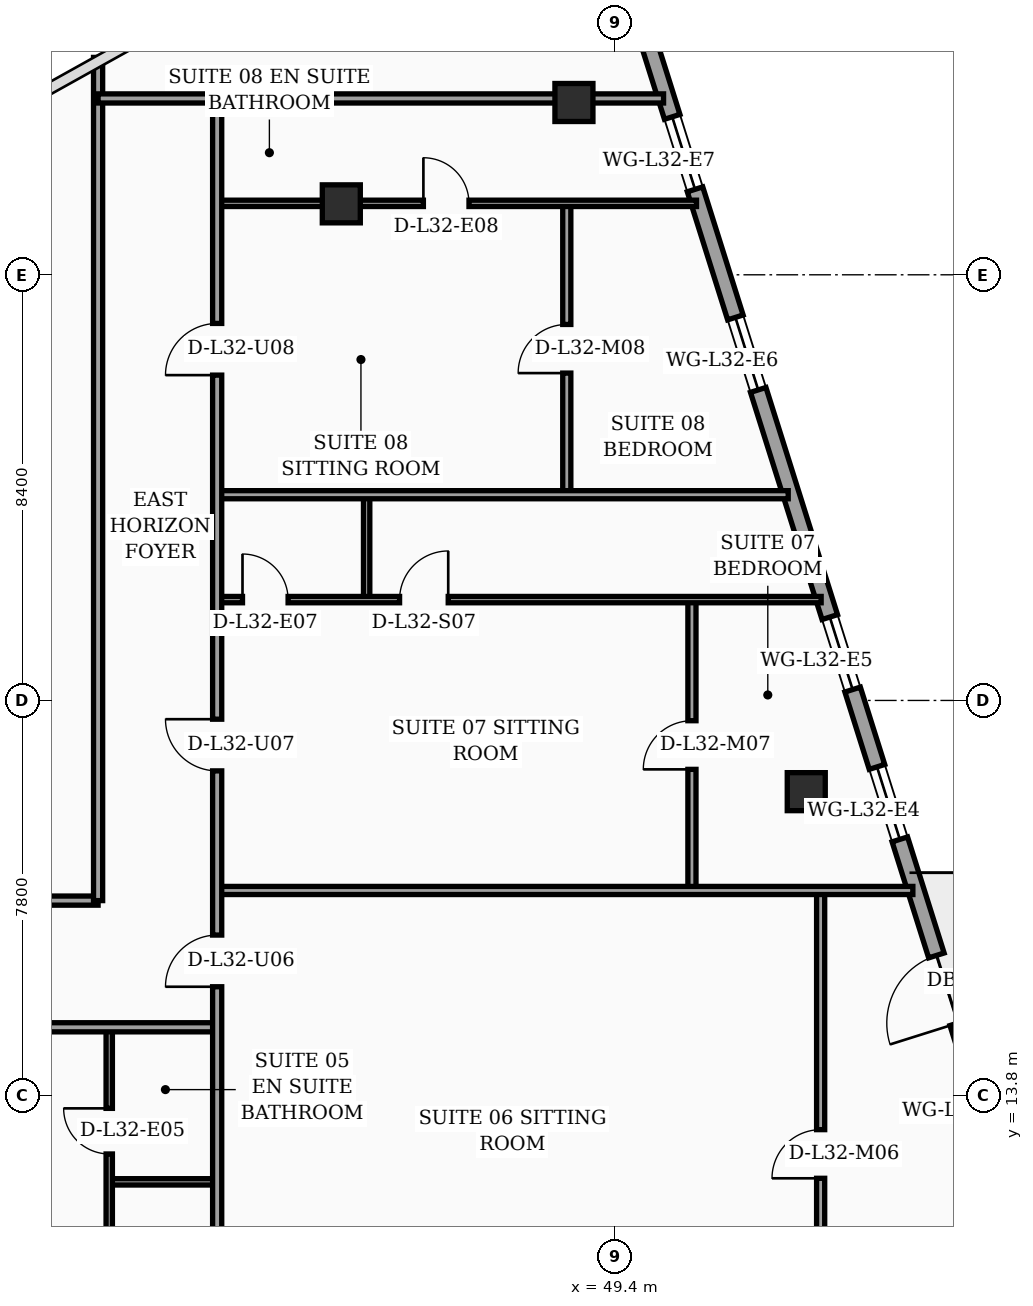
"""IFC4 building model, lengths in metres.
Left out: names, types, materials, properties, quantities, classifications, styles, units other than length and angle.
Written with IfcOpenShell. Run it as: python <this file> out.ifc"""

import sys

from ifc_helpers import new_model, si_unit, direction, frame, frame_2d, origin, origin_2d, place, context, subcontext, project, spatial, rectangle, hollow_rectangle, extrude, element, fill, save


model = new_model("IFC4")
c1 = context("Model", 3, precision=1e-05, world=origin(), true_north=direction((0.0, 1.0)))
c2 = subcontext(c1, "Body", "Model", "MODEL_VIEW")
j1 = project(units=[si_unit("LENGTHUNIT", "METRE"), si_unit("PLANEANGLEUNIT", "RADIAN")], contexts=[c1])
p1 = place(None, origin())
s1 = spatial("IfcSite", under=j1, at=p1, CompositionType="ELEMENT")
p2 = place(p1, origin())
s2 = spatial("IfcBuilding", under=s1, at=p2, CompositionType="ELEMENT")
p3 = place(p2, frame((0.0, 0.0, 131.6)))
s3 = spatial("IfcBuildingStorey", under=s2, at=p3, CompositionType="ELEMENT", Elevation=131.6)
for number, where, z_axis, x_axis in (
    (1, (44.0, 31.4, 0.0), (0.0, 0.0, 1.0), (1.0, 0.0, 0.0)),
    (2, (53.176, 19.8, 0.0), (0.0, 0.0, 1.0), (1.0, 0.0, 0.0)),
    (3, (48.591, 33.4, 0.0), (0.0, 0.0, 1.0), (1.0, 0.0, 0.0)),
):
    element("IfcColumn", number, at=place(p3, frame(where, z_axis=z_axis, x_axis=x_axis)), inside=s3, PredefinedType="COLUMN", context=c2, shape_type="SweptSolid", body=[
        extrude(hollow_rectangle(XDim=0.75, YDim=0.75, WallThickness=0.032, at=origin_2d()), origin(), (0.0, 0.0, 1.0), 3.56),
    ])
p4 = place(p3, frame((59.23, 5.505, 0.0), z_axis=(0.0, 0.0, 1.0), x_axis=(-0.300509063924, 0.953778958931, 0.0)))
e4 = element("IfcWall", 4, at=p4, inside=s3, PredefinedType="SOLIDWALL", context=c2, shape_type="SweptSolid", body=[
    extrude(rectangle(XDim=30.814, YDim=0.32, at=frame_2d((15.407, 0.0))), origin(), (0.0, 0.0, 1.0), 3.56),
])
p5 = place(p4, frame((10.199, 0.0, 0.0)))
e5 = element("IfcOpeningElement", 5, at=p5, cuts=e4, PredefinedType="OPENING", context=c2, shape_type="SweptSolid", body=[
    extrude(rectangle(XDim=1.4, YDim=2.25, at=frame_2d((0.7, 1.125))), frame((0.0, 0.17, 0.0), z_axis=(0.0, -1.0, 0.0), x_axis=(1.0, 0.0, 0.0)), (0.0, 0.0, 1.0), 0.34),
])
p6 = place(p4, frame((2.65, 0.0, 0.75)))
e6 = element("IfcOpeningElement", 6, at=p6, cuts=e4, PredefinedType="OPENING", context=c2, shape_type="SweptSolid", body=[
    extrude(rectangle(XDim=1.5, YDim=1.6, at=frame_2d((0.75, 0.8))), frame((0.0, 0.17, 0.0), z_axis=(0.0, -1.0, 0.0), x_axis=(1.0, 0.0, 0.0)), (0.0, 0.0, 1.0), 0.34),
])
p7 = place(p4, frame((4.7, 0.0, 0.75)))
e7 = element("IfcOpeningElement", 7, at=p7, cuts=e4, PredefinedType="OPENING", context=c2, shape_type="SweptSolid", body=[
    extrude(rectangle(XDim=1.5, YDim=1.6, at=frame_2d((0.75, 0.8))), frame((0.0, 0.17, 0.0), z_axis=(0.0, -1.0, 0.0), x_axis=(1.0, 0.0, 0.0)), (0.0, 0.0, 1.0), 0.34),
])
p8 = place(p4, frame((7.8, 0.0, 0.75)))
e8 = element("IfcOpeningElement", 8, at=p8, cuts=e4, PredefinedType="OPENING", context=c2, shape_type="SweptSolid", body=[
    extrude(rectangle(XDim=1.5, YDim=1.6, at=frame_2d((0.75, 0.8))), frame((0.0, 0.17, 0.0), z_axis=(0.0, -1.0, 0.0), x_axis=(1.0, 0.0, 0.0)), (0.0, 0.0, 1.0), 0.34),
])
p9 = place(p4, frame((14.0, 0.0, 0.75)))
e9 = element("IfcOpeningElement", 9, at=p9, cuts=e4, PredefinedType="OPENING", context=c2, shape_type="SweptSolid", body=[
    extrude(rectangle(XDim=1.5, YDim=1.6, at=frame_2d((0.75, 0.8))), frame((0.0, 0.17, 0.0), z_axis=(0.0, -1.0, 0.0), x_axis=(1.0, 0.0, 0.0)), (0.0, 0.0, 1.0), 0.34),
])
p10 = place(p4, frame((17.1, 0.0, 0.75)))
e10 = element("IfcOpeningElement", 10, at=p10, cuts=e4, PredefinedType="OPENING", context=c2, shape_type="SweptSolid", body=[
    extrude(rectangle(XDim=1.5, YDim=1.6, at=frame_2d((0.75, 0.8))), frame((0.0, 0.17, 0.0), z_axis=(0.0, -1.0, 0.0), x_axis=(1.0, 0.0, 0.0)), (0.0, 0.0, 1.0), 0.34),
])
p11 = place(p4, frame((23.3, 0.0, 0.75)))
e11 = element("IfcOpeningElement", 11, at=p11, cuts=e4, PredefinedType="OPENING", context=c2, shape_type="SweptSolid", body=[
    extrude(rectangle(XDim=1.5, YDim=1.6, at=frame_2d((0.75, 0.8))), frame((0.0, 0.17, 0.0), z_axis=(0.0, -1.0, 0.0), x_axis=(1.0, 0.0, 0.0)), (0.0, 0.0, 1.0), 0.34),
])
p12 = place(p4, frame((27.45, 0.0, 0.75)))
e12 = element("IfcOpeningElement", 12, at=p12, cuts=e4, PredefinedType="OPENING", context=c2, shape_type="SweptSolid", body=[
    extrude(rectangle(XDim=1.5, YDim=1.6, at=frame_2d((0.75, 0.8))), frame((0.0, 0.17, 0.0), z_axis=(0.0, -1.0, 0.0), x_axis=(1.0, 0.0, 0.0)), (0.0, 0.0, 1.0), 0.34),
])
p13 = place(p3, frame((39.42, 12.1, 0.0), z_axis=(0.0, 0.0, 1.0), x_axis=(1.0, 0.0, 0.0)))
e13 = element("IfcWall", 13, at=p13, inside=s3, PredefinedType="PARTITIONING", context=c2, shape_type="SweptSolid", body=[
    extrude(rectangle(XDim=2.13, YDim=0.125, at=frame_2d((1.065, 0.0))), origin(), (0.0, 0.0, 1.0), 3.56),
])
p14 = place(p3, frame((39.42, 2.44, 0.0), z_axis=(0.0, 0.0, 1.0), x_axis=(0.0, 1.0, 0.0)))
e14 = element("IfcWall", 14, at=p14, inside=s3, PredefinedType="PARTITIONING", context=c2, shape_type="SweptSolid", body=[
    extrude(rectangle(XDim=12.71, YDim=0.125, at=frame_2d((6.355, 0.0))), origin(), (0.0, 0.0, 1.0), 2.84),
])
p15 = place(p14, frame((4.35, 0.0, 0.0)))
e15 = element("IfcOpeningElement", 15, at=p15, cuts=e14, PredefinedType="OPENING", context=c2, shape_type="SweptSolid", body=[
    extrude(rectangle(XDim=0.96, YDim=2.2, at=frame_2d((0.48, 1.1))), frame((0.0, 0.073, 0.0), z_axis=(0.0, -1.0, 0.0), x_axis=(1.0, 0.0, 0.0)), (0.0, 0.0, 1.0), 0.145),
])
p16 = place(p14, frame((10.21, 0.0, 0.0)))
e16 = element("IfcOpeningElement", 16, at=p16, cuts=e14, PredefinedType="OPENING", context=c2, shape_type="SweptSolid", body=[
    extrude(rectangle(XDim=0.9, YDim=2.15, at=frame_2d((0.45, 1.075))), frame((0.0, 0.073, 0.0), z_axis=(0.0, -1.0, 0.0), x_axis=(1.0, 0.0, 0.0)), (0.0, 0.0, 1.0), 0.145),
])
p17 = place(p3, frame((32.4, 15.15, 0.0), z_axis=(0.0, 0.0, 1.0), x_axis=(1.0, 0.0, 0.0)))
e17 = element("IfcWall", 17, at=p17, inside=s3, PredefinedType="PARTITIONING", context=c2, shape_type="SweptSolid", body=[
    extrude(rectangle(XDim=9.15, YDim=0.18, at=frame_2d((4.575, 0.0))), origin(), (0.0, 0.0, 1.0), 2.84),
])
p18 = place(p17, frame((3.1, 0.0, 0.0)))
e18 = element("IfcOpeningElement", 18, at=p18, cuts=e17, PredefinedType="OPENING", context=c2, shape_type="SweptSolid", body=[
    extrude(rectangle(XDim=1.02, YDim=2.2, at=frame_2d((0.51, 1.1))), frame((0.0, 0.1, 0.0), z_axis=(0.0, -1.0, 0.0), x_axis=(1.0, 0.0, 0.0)), (0.0, 0.0, 1.0), 0.2),
])
p19 = place(p3, frame((21.5, 17.65, 0.0), z_axis=(0.0, 0.0, 1.0), x_axis=(1.0, 0.0, 0.0)))
e19 = element("IfcWall", 19, at=p19, inside=s3, PredefinedType="PARTITIONING", context=c2, shape_type="SweptSolid", body=[
    extrude(rectangle(XDim=17.7, YDim=0.18, at=frame_2d((8.85, 0.0))), origin(), (0.0, 0.0, 1.0), 2.84),
])
p20 = place(p19, frame((0.95, 0.0, 0.0)))
e20 = element("IfcOpeningElement", 20, at=p20, cuts=e19, PredefinedType="OPENING", context=c2, shape_type="SweptSolid", body=[
    extrude(rectangle(XDim=1.02, YDim=2.2, at=frame_2d((0.51, 1.1))), frame((0.0, 0.1, 0.0), z_axis=(0.0, -1.0, 0.0), x_axis=(1.0, 0.0, 0.0)), (0.0, 0.0, 1.0), 0.2),
])
p21 = place(p19, frame((10.4, 0.0, 0.0)))
e21 = element("IfcOpeningElement", 21, at=p21, cuts=e19, PredefinedType="OPENING", context=c2, shape_type="SweptSolid", body=[
    extrude(rectangle(XDim=1.02, YDim=2.2, at=frame_2d((0.51, 1.1))), frame((0.0, 0.1, 0.0), z_axis=(0.0, -1.0, 0.0), x_axis=(1.0, 0.0, 0.0)), (0.0, 0.0, 1.0), 0.2),
])
p22 = place(p3, frame((39.2, 17.65, 0.0), z_axis=(0.0, 0.0, 1.0), x_axis=(0.0, 1.0, 0.0)))
e22 = element("IfcWall", 22, at=p22, inside=s3, PredefinedType="PARTITIONING", context=c2, shape_type="SweptSolid", body=[
    extrude(rectangle(XDim=16.64, YDim=0.18, at=frame_2d((8.32, 0.0))), origin(), (0.0, 0.0, 1.0), 2.84),
])
p23 = place(p3, frame((53.46, 7.45, 0.0), z_axis=(0.0, 0.0, 1.0), x_axis=(0.0, 1.0, 0.0)))
e23 = element("IfcWall", 23, at=p23, inside=s3, PredefinedType="PARTITIONING", context=c2, shape_type="SweptSolid", body=[
    extrude(rectangle(XDim=10.4, YDim=0.16, at=frame_2d((5.2, 0.0))), origin(), (0.0, 0.0, 1.0), 3.04),
])
p24 = place(p23, frame((4.72, 0.0, 0.0)))
e24 = element("IfcOpeningElement", 24, at=p24, cuts=e23, PredefinedType="OPENING", context=c2, shape_type="SweptSolid", body=[
    extrude(rectangle(XDim=0.96, YDim=2.2, at=frame_2d((0.48, 1.1))), frame((0.0, 0.09, 0.0), z_axis=(0.0, -1.0, 0.0), x_axis=(1.0, 0.0, 0.0)), (0.0, 0.0, 1.0), 0.18),
])
p25 = place(p3, frame((44.5, 23.59, 0.0), z_axis=(0.0, 0.0, 1.0), x_axis=(0.0, 1.0, 0.0)))
e25 = element("IfcWall", 25, at=p25, inside=s3, PredefinedType="PARTITIONING", context=c2, shape_type="SweptSolid", body=[
    extrude(rectangle(XDim=2.07, YDim=0.125, at=frame_2d((1.035, 0.0))), origin(), (0.0, 0.0, 1.0), 3.19),
])
p26 = place(p3, frame((50.92, 17.85, 0.0), z_axis=(0.0, 0.0, 1.0), x_axis=(0.0, 1.0, 0.0)))
e26 = element("IfcWall", 26, at=p26, inside=s3, PredefinedType="PARTITIONING", context=c2, shape_type="SweptSolid", body=[
    extrude(rectangle(XDim=5.74, YDim=0.16, at=frame_2d((2.87, 0.0))), origin(), (0.0, 0.0, 1.0), 2.84),
])
p27 = place(p26, frame((2.39, 0.0, 0.0)))
e27 = element("IfcOpeningElement", 27, at=p27, cuts=e26, PredefinedType="OPENING", context=c2, shape_type="SweptSolid", body=[
    extrude(rectangle(XDim=0.96, YDim=2.2, at=frame_2d((0.48, 1.1))), frame((0.0, 0.09, 0.0), z_axis=(0.0, -1.0, 0.0), x_axis=(1.0, 0.0, 0.0)), (0.0, 0.0, 1.0), 0.18),
])
p28 = place(p3, frame((41.55, 23.59, 0.0), z_axis=(0.0, 0.0, 1.0), x_axis=(1.0, 0.0, 0.0)))
e28 = element("IfcWall", 28, at=p28, inside=s3, PredefinedType="PARTITIONING", context=c2, shape_type="SweptSolid", body=[
    extrude(rectangle(XDim=11.92, YDim=0.125, at=frame_2d((5.96, 0.0))), origin(), (0.0, 0.0, 1.0), 2.84),
])
p29 = place(p28, frame((0.5, 0.0, 0.0)))
e29 = element("IfcOpeningElement", 29, at=p29, cuts=e28, PredefinedType="OPENING", context=c2, shape_type="SweptSolid", body=[
    extrude(rectangle(XDim=0.9, YDim=2.15, at=frame_2d((0.45, 1.075))), frame((0.0, 0.073, 0.0), z_axis=(0.0, -1.0, 0.0), x_axis=(1.0, 0.0, 0.0)), (0.0, 0.0, 1.0), 0.145),
])
p30 = place(p28, frame((3.6, 0.0, 0.0)))
e30 = element("IfcOpeningElement", 30, at=p30, cuts=e28, PredefinedType="OPENING", context=c2, shape_type="SweptSolid", body=[
    extrude(rectangle(XDim=0.96, YDim=2.2, at=frame_2d((0.48, 1.1))), frame((0.0, 0.073, 0.0), z_axis=(0.0, -1.0, 0.0), x_axis=(1.0, 0.0, 0.0)), (0.0, 0.0, 1.0), 0.145),
])
p31 = place(p3, frame((48.45, 25.66, 0.0), z_axis=(0.0, 0.0, 1.0), x_axis=(0.0, 1.0, 0.0)))
e31 = element("IfcWall", 31, at=p31, inside=s3, PredefinedType="PARTITIONING", context=c2, shape_type="SweptSolid", body=[
    extrude(rectangle(XDim=5.75, YDim=0.16, at=frame_2d((2.875, 0.0))), origin(), (0.0, 0.0, 1.0), 3.09),
])
p32 = place(p31, frame((2.4, 0.0, 0.0)))
e32 = element("IfcOpeningElement", 32, at=p32, cuts=e31, PredefinedType="OPENING", context=c2, shape_type="SweptSolid", body=[
    extrude(rectangle(XDim=0.96, YDim=2.2, at=frame_2d((0.48, 1.1))), frame((0.0, 0.09, 0.0), z_axis=(0.0, -1.0, 0.0), x_axis=(1.0, 0.0, 0.0)), (0.0, 0.0, 1.0), 0.18),
])
p33 = place(p3, frame((41.55, 31.41, 0.0), z_axis=(0.0, 0.0, 1.0), x_axis=(1.0, 0.0, 0.0)))
e33 = element("IfcWall", 33, at=p33, inside=s3, PredefinedType="PARTITIONING", context=c2, shape_type="SweptSolid", body=[
    extrude(rectangle(XDim=9.46, YDim=0.125, at=frame_2d((4.73, 0.0))), origin(), (0.0, 0.0, 1.0), 2.84),
])
p34 = place(p33, frame((4.07, 0.0, 0.0)))
e34 = element("IfcOpeningElement", 34, at=p34, cuts=e33, PredefinedType="OPENING", context=c2, shape_type="SweptSolid", body=[
    extrude(rectangle(XDim=0.9, YDim=2.15, at=frame_2d((0.45, 1.075))), frame((0.0, 0.073, 0.0), z_axis=(0.0, -1.0, 0.0), x_axis=(1.0, 0.0, 0.0)), (0.0, 0.0, 1.0), 0.145),
])
p35 = place(p3, frame((41.55, 25.66, 0.0), z_axis=(0.0, 0.0, 1.0), x_axis=(1.0, 0.0, 0.0)))
e35 = element("IfcWall", 35, at=p35, inside=s3, PredefinedType="PARTITIONING", context=c2, shape_type="SweptSolid", body=[
    extrude(rectangle(XDim=11.27, YDim=0.16, at=frame_2d((5.635, 0.0))), origin(), (0.0, 0.0, 1.0), 2.84),
])
p36 = place(p3, frame((41.55, 17.85, 0.0), z_axis=(0.0, 0.0, 1.0), x_axis=(1.0, 0.0, 0.0)))
e36 = element("IfcWall", 36, at=p36, inside=s3, PredefinedType="PARTITIONING", context=c2, shape_type="SweptSolid", body=[
    extrude(rectangle(XDim=13.73, YDim=0.16, at=frame_2d((6.865, 0.0))), origin(), (0.0, 0.0, 1.0), 2.84),
])
p37 = place(p3, frame((41.55, 33.48, 0.0), z_axis=(0.0, 0.0, 1.0), x_axis=(1.0, 0.0, 0.0)))
e37 = element("IfcWall", 37, at=p37, inside=s3, PredefinedType="PARTITIONING", context=c2, shape_type="SweptSolid", body=[
    extrude(rectangle(XDim=8.81, YDim=0.18, at=frame_2d((4.405, 0.0))), origin(), (0.0, 0.0, 1.0), 2.84),
])
p38 = place(p3, frame((41.55, 2.44, 0.0), z_axis=(0.0, 0.0, 1.0), x_axis=(0.0, 1.0, 0.0)))
e38 = element("IfcWall", 38, at=p38, inside=s3, PredefinedType="PARTITIONING", context=c2, shape_type="SweptSolid", body=[
    extrude(rectangle(XDim=31.04, YDim=0.18, at=frame_2d((15.52, 0.0))), origin(), (0.0, 0.0, 1.0), 2.84),
])
p39 = place(p38, frame((13.51, 0.0, 0.0)))
e39 = element("IfcOpeningElement", 39, at=p39, cuts=e38, PredefinedType="OPENING", context=c2, shape_type="SweptSolid", body=[
    extrude(rectangle(XDim=1.02, YDim=2.2, at=frame_2d((0.51, 1.1))), frame((0.0, 0.1, 0.0), z_axis=(0.0, -1.0, 0.0), x_axis=(1.0, 0.0, 0.0)), (0.0, 0.0, 1.0), 0.2),
])
p40 = place(p38, frame((17.77, 0.0, 0.0)))
e40 = element("IfcOpeningElement", 40, at=p40, cuts=e38, PredefinedType="OPENING", context=c2, shape_type="SweptSolid", body=[
    extrude(rectangle(XDim=1.02, YDim=2.2, at=frame_2d((0.51, 1.1))), frame((0.0, 0.1, 0.0), z_axis=(0.0, -1.0, 0.0), x_axis=(1.0, 0.0, 0.0)), (0.0, 0.0, 1.0), 0.2),
])
p41 = place(p38, frame((25.58, 0.0, 0.0)))
e41 = element("IfcOpeningElement", 41, at=p41, cuts=e38, PredefinedType="OPENING", context=c2, shape_type="SweptSolid", body=[
    extrude(rectangle(XDim=1.02, YDim=2.2, at=frame_2d((0.51, 1.1))), frame((0.0, 0.1, 0.0), z_axis=(0.0, -1.0, 0.0), x_axis=(1.0, 0.0, 0.0)), (0.0, 0.0, 1.0), 0.2),
])
p42 = place(p3, frame((39.2, 33.48, 0.0), z_axis=(0.0, 0.0, 1.0), x_axis=(1.0, 0.0, 0.0)))
e42 = element("IfcWall", 42, at=p42, inside=s3, PredefinedType="PARTITIONING", context=c2, shape_type="SweptSolid", body=[
    extrude(rectangle(XDim=2.35, YDim=0.18, at=frame_2d((1.175, 0.0))), origin(), (0.0, 0.0, 1.0), 3.56),
])
p43 = place(p5, origin())
e43 = element("IfcDoor", 43, at=p43, inside=s3, OperationType="SINGLE_SWING_LEFT", PredefinedType="DOOR", context=c2, shape_type="SweptSolid", body=[
    extrude(rectangle(XDim=1.4, YDim=2.25, at=frame_2d((0.7, 1.125))), frame((0.0, 0.025, 0.0), z_axis=(0.0, -1.0, 0.0), x_axis=(1.0, 0.0, 0.0)), (0.0, 0.0, 1.0), 0.05),
])
fill(e5, e43)
p44 = place(p9, origin())
e44 = element("IfcWindow", 44, at=p44, inside=s3, PartitioningType="SINGLE_PANEL", PredefinedType="WINDOW", context=c2, shape_type="SweptSolid", body=[
    extrude(rectangle(XDim=1.5, YDim=1.6, at=frame_2d((0.75, 0.8))), frame((0.0, 0.03, 0.0), z_axis=(0.0, -1.0, 0.0), x_axis=(1.0, 0.0, 0.0)), (0.0, 0.0, 1.0), 0.06),
])
fill(e9, e44)
p45 = place(p10, origin())
e45 = element("IfcWindow", 45, at=p45, inside=s3, PartitioningType="SINGLE_PANEL", PredefinedType="WINDOW", context=c2, shape_type="SweptSolid", body=[
    extrude(rectangle(XDim=1.5, YDim=1.6, at=frame_2d((0.75, 0.8))), frame((0.0, 0.03, 0.0), z_axis=(0.0, -1.0, 0.0), x_axis=(1.0, 0.0, 0.0)), (0.0, 0.0, 1.0), 0.06),
])
fill(e10, e45)
p46 = place(p11, origin())
e46 = element("IfcWindow", 46, at=p46, inside=s3, PartitioningType="SINGLE_PANEL", PredefinedType="WINDOW", context=c2, shape_type="SweptSolid", body=[
    extrude(rectangle(XDim=1.5, YDim=1.6, at=frame_2d((0.75, 0.8))), frame((0.0, 0.03, 0.0), z_axis=(0.0, -1.0, 0.0), x_axis=(1.0, 0.0, 0.0)), (0.0, 0.0, 1.0), 0.06),
])
fill(e11, e46)
p47 = place(p12, origin())
e47 = element("IfcWindow", 47, at=p47, inside=s3, PartitioningType="SINGLE_PANEL", PredefinedType="WINDOW", context=c2, shape_type="SweptSolid", body=[
    extrude(rectangle(XDim=1.5, YDim=1.6, at=frame_2d((0.75, 0.8))), frame((0.0, 0.03, 0.0), z_axis=(0.0, -1.0, 0.0), x_axis=(1.0, 0.0, 0.0)), (0.0, 0.0, 1.0), 0.06),
])
fill(e12, e47)
p48 = place(p16, origin())
e48 = element("IfcDoor", 48, at=p48, inside=s3, OperationType="SINGLE_SWING_RIGHT", PredefinedType="DOOR", context=c2, shape_type="SweptSolid", body=[
    extrude(rectangle(XDim=0.9, YDim=2.15, at=frame_2d((0.45, 1.075))), frame((0.0, 0.025, 0.0), z_axis=(0.0, -1.0, 0.0), x_axis=(1.0, 0.0, 0.0)), (0.0, 0.0, 1.0), 0.05),
])
fill(e16, e48)
p49 = place(p24, origin())
e49 = element("IfcDoor", 49, at=p49, inside=s3, OperationType="SINGLE_SWING_LEFT", PredefinedType="DOOR", context=c2, shape_type="SweptSolid", body=[
    extrude(rectangle(XDim=0.96, YDim=2.2, at=frame_2d((0.48, 1.1))), frame((0.0, 0.025, 0.0), z_axis=(0.0, -1.0, 0.0), x_axis=(1.0, 0.0, 0.0)), (0.0, 0.0, 1.0), 0.05),
])
fill(e24, e49)
p50 = place(p27, origin())
e50 = element("IfcDoor", 50, at=p50, inside=s3, OperationType="SINGLE_SWING_LEFT", PredefinedType="DOOR", context=c2, shape_type="SweptSolid", body=[
    extrude(rectangle(XDim=0.96, YDim=2.2, at=frame_2d((0.48, 1.1))), frame((0.0, 0.025, 0.0), z_axis=(0.0, -1.0, 0.0), x_axis=(1.0, 0.0, 0.0)), (0.0, 0.0, 1.0), 0.05),
])
fill(e27, e50)
p51 = place(p29, origin())
e51 = element("IfcDoor", 51, at=p51, inside=s3, OperationType="SINGLE_SWING_LEFT", PredefinedType="DOOR", context=c2, shape_type="SweptSolid", body=[
    extrude(rectangle(XDim=0.9, YDim=2.15, at=frame_2d((0.45, 1.075))), frame((0.0, 0.025, 0.0), z_axis=(0.0, -1.0, 0.0), x_axis=(1.0, 0.0, 0.0)), (0.0, 0.0, 1.0), 0.05),
])
fill(e29, e51)
p52 = place(p30, origin())
e52 = element("IfcDoor", 52, at=p52, inside=s3, OperationType="SINGLE_SWING_RIGHT", PredefinedType="DOOR", context=c2, shape_type="SweptSolid", body=[
    extrude(rectangle(XDim=0.96, YDim=2.2, at=frame_2d((0.48, 1.1))), frame((0.0, 0.025, 0.0), z_axis=(0.0, -1.0, 0.0), x_axis=(1.0, 0.0, 0.0)), (0.0, 0.0, 1.0), 0.05),
])
fill(e30, e52)
p53 = place(p32, origin())
e53 = element("IfcDoor", 53, at=p53, inside=s3, OperationType="SINGLE_SWING_LEFT", PredefinedType="DOOR", context=c2, shape_type="SweptSolid", body=[
    extrude(rectangle(XDim=0.96, YDim=2.2, at=frame_2d((0.48, 1.1))), frame((0.0, 0.025, 0.0), z_axis=(0.0, -1.0, 0.0), x_axis=(1.0, 0.0, 0.0)), (0.0, 0.0, 1.0), 0.05),
])
fill(e32, e53)
p54 = place(p34, origin())
e54 = element("IfcDoor", 54, at=p54, inside=s3, OperationType="SINGLE_SWING_LEFT", PredefinedType="DOOR", context=c2, shape_type="SweptSolid", body=[
    extrude(rectangle(XDim=0.9, YDim=2.15, at=frame_2d((0.45, 1.075))), frame((0.0, 0.025, 0.0), z_axis=(0.0, -1.0, 0.0), x_axis=(1.0, 0.0, 0.0)), (0.0, 0.0, 1.0), 0.05),
])
fill(e34, e54)
p55 = place(p39, origin())
e55 = element("IfcDoor", 55, at=p55, inside=s3, OperationType="SINGLE_SWING_LEFT", PredefinedType="DOOR", context=c2, shape_type="SweptSolid", body=[
    extrude(rectangle(XDim=1.02, YDim=2.2, at=frame_2d((0.51, 1.1))), frame((0.0, 0.025, 0.0), z_axis=(0.0, -1.0, 0.0), x_axis=(1.0, 0.0, 0.0)), (0.0, 0.0, 1.0), 0.05),
])
fill(e39, e55)
p56 = place(p40, origin())
e56 = element("IfcDoor", 56, at=p56, inside=s3, OperationType="SINGLE_SWING_RIGHT", PredefinedType="DOOR", context=c2, shape_type="SweptSolid", body=[
    extrude(rectangle(XDim=1.02, YDim=2.2, at=frame_2d((0.51, 1.1))), frame((0.0, 0.025, 0.0), z_axis=(0.0, -1.0, 0.0), x_axis=(1.0, 0.0, 0.0)), (0.0, 0.0, 1.0), 0.05),
])
fill(e40, e56)
p57 = place(p41, origin())
e57 = element("IfcDoor", 57, at=p57, inside=s3, OperationType="SINGLE_SWING_LEFT", PredefinedType="DOOR", context=c2, shape_type="SweptSolid", body=[
    extrude(rectangle(XDim=1.02, YDim=2.2, at=frame_2d((0.51, 1.1))), frame((0.0, 0.025, 0.0), z_axis=(0.0, -1.0, 0.0), x_axis=(1.0, 0.0, 0.0)), (0.0, 0.0, 1.0), 0.05),
])
fill(e41, e57)
save(model, sys.argv[1])
